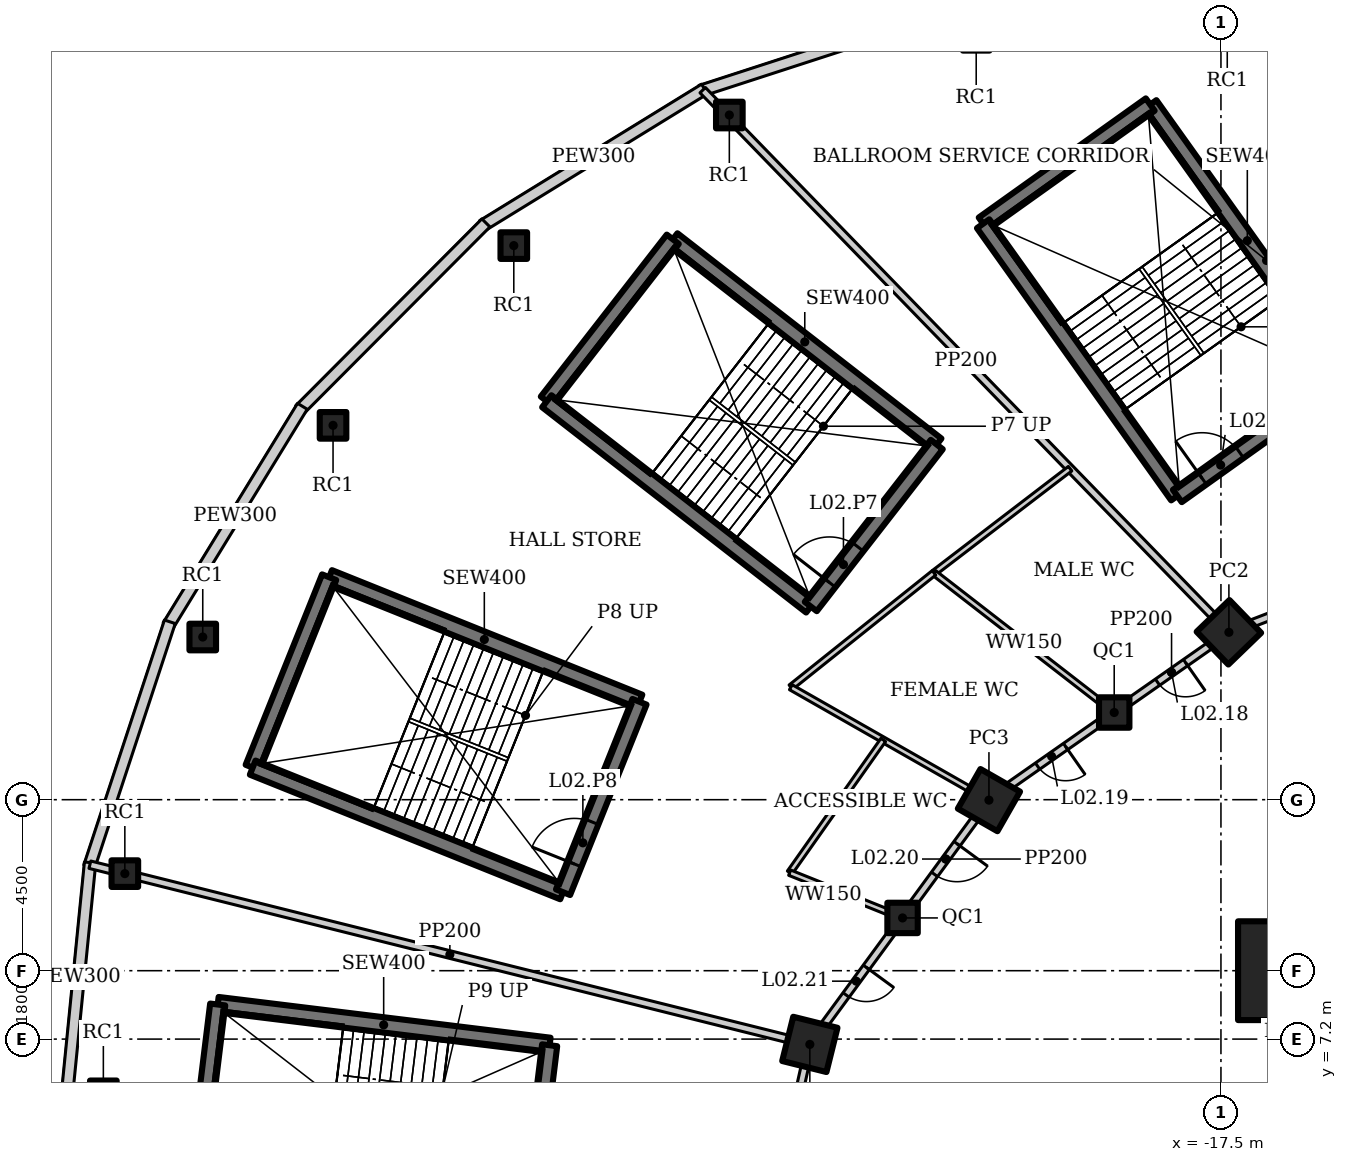
"""IFC4 building model, lengths in metres.
Left out: names, types, materials, properties, quantities, classifications, styles, units other than length and angle.
Written with IfcOpenShell. Run it as: python <this file> out.ifc"""

import sys

from ifc_helpers import new_model, si_unit, direction, frame, frame_2d, origin, origin_2d, place, context, subcontext, project, spatial, rectangle, hollow_rectangle, extrude, element, fill, save


model = new_model("IFC4")
c1 = context("Model", 3, precision=1e-05, world=origin(), true_north=direction((0.0, 1.0)))
c2 = subcontext(c1, "Body", "Model", "MODEL_VIEW")
j1 = project(units=[si_unit("LENGTHUNIT", "METRE"), si_unit("PLANEANGLEUNIT", "RADIAN")], contexts=[c1])
p1 = place(None, origin())
s1 = spatial("IfcSite", under=j1, at=p1, CompositionType="ELEMENT")
p2 = place(p1, origin())
s2 = spatial("IfcBuilding", under=s1, at=p2, CompositionType="ELEMENT")
p3 = place(p2, frame((0.0, 0.0, 14.5)))
s3 = spatial("IfcBuildingStorey", under=s2, at=p3, CompositionType="ELEMENT", Elevation=14.5)
p4 = place(p3, frame((-15.75, 9.0, 0.0), z_axis=(0.0, 0.0, 1.0), x_axis=(1.0, 0.0, 0.0)))
e1 = element("IfcColumn", 1, at=p4, inside=s3, PredefinedType="COLUMN", context=c2, shape_type="SweptSolid", body=[
    extrude(hollow_rectangle(XDim=2.6, YDim=2.6, WallThickness=0.13, at=origin_2d()), origin(), (0.0, 0.0, 1.0), 7.5),
])
p5 = place(p3, frame((-17.291, 17.905, 0.0), z_axis=(0.0, 0.0, 1.0), x_axis=(0.719339800339, 0.694658370459, 0.0)))
e2 = element("IfcColumn", 2, at=p5, inside=s3, PredefinedType="COLUMN", context=c2, shape_type="SweptSolid", body=[
    extrude(hollow_rectangle(XDim=1.2, YDim=1.2, WallThickness=0.1, at=origin_2d()), origin(), (0.0, 0.0, 1.0), 7.5),
])
p6 = place(p3, frame((-23.605, 13.489, 0.0), z_axis=(0.0, 0.0, 1.0), x_axis=(0.496139221777, 0.86824298017, 0.0)))
e3 = element("IfcColumn", 3, at=p6, inside=s3, PredefinedType="COLUMN", context=c2, shape_type="SweptSolid", body=[
    extrude(hollow_rectangle(XDim=1.2, YDim=1.2, WallThickness=0.12, at=origin_2d()), origin(), (0.0, 0.0, 1.0), 7.5),
])
p7 = place(p3, frame((-28.318, 7.06, 0.0), z_axis=(0.0, 0.0, 1.0), x_axis=(0.2419218956, 0.970295726276, 0.0)))
e4 = element("IfcColumn", 4, at=p7, inside=s3, PredefinedType="COLUMN", context=c2, shape_type="SweptSolid", body=[
    extrude(hollow_rectangle(XDim=1.2, YDim=1.2, WallThickness=0.1, at=origin_2d()), origin(), (0.0, 0.0, 1.0), 7.5),
])
for number, where, z_axis, x_axis in (
    (5, (-20.309, 15.794, 0.0), (0.0, 0.0, 1.0), (1.0, 0.0, 0.0)),
    (6, (-25.878, 10.388, 0.0), (0.0, 0.0, 1.0), (1.0, 0.0, 0.0)),
):
    element("IfcColumn", number, at=place(p3, frame(where, z_axis=z_axis, x_axis=x_axis)), inside=s3, PredefinedType="COLUMN", context=c2, shape_type="SweptSolid", body=[
        extrude(hollow_rectangle(XDim=0.8, YDim=0.8, WallThickness=0.05, at=origin_2d()), origin(), (0.0, 0.0, 1.0), 7.5),
    ])
for number, where, z_axis, x_axis in (
    (7, (-36.108, 28.081, 0.0), (0.0, 0.0, 1.0), (1.0, 0.0, 0.0)),
    (8, (-44.292, 17.781, 0.0), (0.0, 0.0, 1.0), (1.0, 0.0, 0.0)),
    (9, (-46.908, 5.76, 0.0), (0.0, 0.0, 1.0), (1.0, 0.0, 0.0)),
    (10, (-30.436, 31.518, 0.0), (0.0, 0.0, 1.0), (1.0, 0.0, 0.0)),
    (11, (-40.864, 23.351, 0.0), (0.0, 0.0, 1.0), (1.0, 0.0, 0.0)),
    (12, (-46.343, 11.554, 0.0), (0.0, 0.0, 1.0), (1.0, 0.0, 0.0)),
):
    element("IfcColumn", number, at=place(p3, frame(where, z_axis=z_axis, x_axis=x_axis)), inside=s3, PredefinedType="COLUMN", context=c2, shape_type="SweptSolid", body=[
        extrude(hollow_rectangle(XDim=0.7, YDim=0.7, WallThickness=0.04, at=origin_2d()), origin(), (0.0, 0.0, 1.0), 7.5),
    ])
p8 = place(p3, frame((-24.495, 34.328, 0.0), z_axis=(0.0, 0.0, 1.0), x_axis=(-0.951140010357, -0.308759907853, 0.0)))
e13 = element("IfcWall", 13, at=p8, inside=s3, PredefinedType="SOLIDWALL", context=c2, shape_type="SweptSolid", body=[
    extrude(rectangle(XDim=7.041, YDim=0.3, at=frame_2d((3.521, 0.0))), origin(), (0.0, 0.0, 1.0), 7.3),
])
p9 = place(p3, frame((-31.088, 32.202, 0.0), z_axis=(0.0, 0.0, 1.0), x_axis=(-0.851808565246, -0.52385319334, 0.0)))
e14 = element("IfcWall", 14, at=p9, inside=s3, PredefinedType="SOLIDWALL", context=c2, shape_type="SweptSolid", body=[
    extrude(rectangle(XDim=6.861, YDim=0.3, at=frame_2d((3.43, 0.0))), origin(), (0.0, 0.0, 1.0), 7.3),
])
p10 = place(p3, frame((-36.842, 28.679, 0.0), z_axis=(0.0, 0.0, 1.0), x_axis=(-0.705874614645, -0.708336804352, 0.0)))
e15 = element("IfcWall", 15, at=p10, inside=s3, PredefinedType="SOLIDWALL", context=c2, shape_type="SweptSolid", body=[
    extrude(rectangle(XDim=6.941, YDim=0.3, at=frame_2d((3.47, 0.0))), origin(), (0.0, 0.0, 1.0), 7.3),
])
p11 = place(p3, frame((-41.67, 23.852, 0.0), z_axis=(0.0, 0.0, 1.0), x_axis=(-0.52225340952, -0.852790347181, 0.0)))
e16 = element("IfcWall", 16, at=p11, inside=s3, PredefinedType="SOLIDWALL", context=c2, shape_type="SweptSolid", body=[
    extrude(rectangle(XDim=6.771, YDim=0.3, at=frame_2d((3.385, 0.0))), origin(), (0.0, 0.0, 1.0), 7.3),
])
p12 = place(p3, frame((-45.158, 18.182, 0.0), z_axis=(0.0, 0.0, 1.0), x_axis=(-0.31263149373, -0.94987449125, 0.0)))
e17 = element("IfcWall", 17, at=p12, inside=s3, PredefinedType="SOLIDWALL", context=c2, shape_type="SweptSolid", body=[
    extrude(rectangle(XDim=6.786, YDim=0.3, at=frame_2d((3.393, 0.0))), origin(), (0.0, 0.0, 1.0), 7.3),
])
p13 = place(p3, frame((-47.257, 11.845, 0.0), z_axis=(0.0, 0.0, 1.0), x_axis=(-0.099051198898, -0.9950823383, 0.0)))
e18 = element("IfcWall", 18, at=p13, inside=s3, PredefinedType="SOLIDWALL", context=c2, shape_type="SweptSolid", body=[
    extrude(rectangle(XDim=6.036, YDim=0.3, at=frame_2d((3.018, 0.0))), origin(), (0.0, 0.0, 1.0), 7.3),
])
p14 = place(p3, frame((-13.745, 19.27, 0.0), z_axis=(0.0, 0.0, 1.0), x_axis=(-0.933224646415, -0.359293416754, 0.0)))
e19 = element("IfcWall", 19, at=p14, inside=s3, PredefinedType="SOLIDWALL", context=c2, shape_type="SweptSolid", body=[
    extrude(rectangle(XDim=3.799, YDim=0.2, at=frame_2d((1.899, 0.0))), origin(), (0.0, 0.0, 1.0), 6.764),
])
p15 = place(p3, frame((-17.291, 17.905, 0.0), z_axis=(0.0, 0.0, 1.0), x_axis=(-0.819409395821, -0.573208724672, 0.0)))
e20 = element("IfcWall", 20, at=p15, inside=s3, PredefinedType="SOLIDWALL", context=c2, shape_type="SweptSolid", body=[
    extrude(rectangle(XDim=3.683, YDim=0.2, at=frame_2d((1.841, 0.0))), origin(), (0.0, 0.0, 1.0), 6.896),
])
p16 = place(p15, frame((1.391, 0.0, 0.0)))
e21 = element("IfcOpeningElement", 21, at=p16, cuts=e20, PredefinedType="OPENING", context=c2, shape_type="SweptSolid", body=[
    extrude(rectangle(XDim=0.9, YDim=2.1, at=frame_2d((0.45, 1.05))), frame((0.0, 0.11, 0.0), z_axis=(0.0, -1.0, 0.0), x_axis=(1.0, 0.0, 0.0)), (0.0, 0.0, 1.0), 0.22),
])
p17 = place(p3, frame((-20.309, 15.794, 0.0), z_axis=(0.0, 0.0, 1.0), x_axis=(-0.819442856133, -0.573160889744, 0.0)))
e22 = element("IfcWall", 22, at=p17, inside=s3, PredefinedType="SOLIDWALL", context=c2, shape_type="SweptSolid", body=[
    extrude(rectangle(XDim=4.023, YDim=0.2, at=frame_2d((2.011, 0.0))), origin(), (0.0, 0.0, 1.0), 6.896),
])
p18 = place(p17, frame((1.561, 0.0, 0.0)))
e23 = element("IfcOpeningElement", 23, at=p18, cuts=e22, PredefinedType="OPENING", context=c2, shape_type="SweptSolid", body=[
    extrude(rectangle(XDim=0.9, YDim=2.1, at=frame_2d((0.45, 1.05))), frame((0.0, 0.11, 0.0), z_axis=(0.0, -1.0, 0.0), x_axis=(1.0, 0.0, 0.0)), (0.0, 0.0, 1.0), 0.22),
])
p19 = place(p3, frame((-23.605, 13.489, 0.0), z_axis=(0.0, 0.0, 1.0), x_axis=(-0.591286566758, -0.806461527893, 0.0)))
e24 = element("IfcWall", 24, at=p19, inside=s3, PredefinedType="SOLIDWALL", context=c2, shape_type="SweptSolid", body=[
    extrude(rectangle(XDim=3.844, YDim=0.2, at=frame_2d((1.922, 0.0))), origin(), (0.0, 0.0, 1.0), 6.896),
])
p20 = place(p19, frame((1.422, 0.0, 0.0)))
e25 = element("IfcOpeningElement", 25, at=p20, cuts=e24, PredefinedType="OPENING", context=c2, shape_type="SweptSolid", body=[
    extrude(rectangle(XDim=1.0, YDim=2.1, at=frame_2d((0.5, 1.05))), frame((0.0, 0.11, 0.0), z_axis=(0.0, -1.0, 0.0), x_axis=(1.0, 0.0, 0.0)), (0.0, 0.0, 1.0), 0.22),
])
p21 = place(p3, frame((-25.878, 10.388, 0.0), z_axis=(0.0, 0.0, 1.0), x_axis=(-0.591255937291, -0.806483984105, 0.0)))
e26 = element("IfcWall", 26, at=p21, inside=s3, PredefinedType="SOLIDWALL", context=c2, shape_type="SweptSolid", body=[
    extrude(rectangle(XDim=4.127, YDim=0.2, at=frame_2d((2.063, 0.0))), origin(), (0.0, 0.0, 1.0), 6.896),
])
p22 = place(p21, frame((1.613, 0.0, 0.0)))
e27 = element("IfcOpeningElement", 27, at=p22, cuts=e26, PredefinedType="OPENING", context=c2, shape_type="SweptSolid", body=[
    extrude(rectangle(XDim=0.9, YDim=2.1, at=frame_2d((0.45, 1.05))), frame((0.0, 0.11, 0.0), z_axis=(0.0, -1.0, 0.0), x_axis=(1.0, 0.0, 0.0)), (0.0, 0.0, 1.0), 0.22),
])
p23 = place(p3, frame((-28.318, 7.06, 0.0), z_axis=(0.0, 0.0, 1.0), x_axis=(-0.218673326171, -0.97579812278, 0.0)))
e28 = element("IfcWall", 28, at=p23, inside=s3, PredefinedType="SOLIDWALL", context=c2, shape_type="SweptSolid", body=[
    extrude(rectangle(XDim=3.574, YDim=0.2, at=frame_2d((1.787, 0.0))), origin(), (0.0, 0.0, 1.0), 6.85),
])
p24 = place(p3, frame((-17.291, 17.905, 0.0), z_axis=(0.0, 0.0, 1.0), x_axis=(-0.696460684513, 0.717594951855, 0.0)))
e29 = element("IfcWall", 29, at=p24, inside=s3, PredefinedType="SOLIDWALL", context=c2, shape_type="SweptSolid", body=[
    extrude(rectangle(XDim=19.881, YDim=0.2, at=frame_2d((9.94, 0.0))), origin(), (0.0, 0.0, 1.0), 5.8),
])
p25 = place(p3, frame((-28.318, 7.06, 0.0), z_axis=(0.0, 0.0, 1.0), x_axis=(-0.970227758662, 0.242194335859, 0.0)))
e30 = element("IfcWall", 30, at=p25, inside=s3, PredefinedType="SOLIDWALL", context=c2, shape_type="SweptSolid", body=[
    extrude(rectangle(XDim=19.526, YDim=0.2, at=frame_2d((9.763, 0.0))), origin(), (0.0, 0.0, 1.0), 5.8),
])
p26 = place(p3, frame((-21.469, 22.211, 0.0), z_axis=(0.0, 0.0, 1.0), x_axis=(-0.794122703503, -0.607757461313, 0.0)))
e31 = element("IfcWall", 31, at=p26, inside=s3, PredefinedType="SOLIDWALL", context=c2, shape_type="SweptSolid", body=[
    extrude(rectangle(XDim=4.51, YDim=0.15, at=frame_2d((2.255, 0.0))), origin(), (0.0, 0.0, 1.0), 7.3),
])
p27 = place(p3, frame((-20.309, 15.794, 0.0), z_axis=(0.0, 0.0, 1.0), x_axis=(-0.790437708207, 0.61254243073, 0.0)))
e32 = element("IfcWall", 32, at=p27, inside=s3, PredefinedType="SOLIDWALL", context=c2, shape_type="SweptSolid", body=[
    extrude(rectangle(XDim=6.0, YDim=0.15, at=frame_2d((3.0, 0.0))), origin(), (0.0, 0.0, 1.0), 7.3),
])
p28 = place(p3, frame((-25.051, 19.469, 0.0), z_axis=(0.0, 0.0, 1.0), x_axis=(-0.781204641684, -0.624275025779, 0.0)))
e33 = element("IfcWall", 33, at=p28, inside=s3, PredefinedType="SOLIDWALL", context=c2, shape_type="SweptSolid", body=[
    extrude(rectangle(XDim=4.821, YDim=0.15, at=frame_2d((2.411, 0.0))), origin(), (0.0, 0.0, 1.0), 7.3),
])
p29 = place(p3, frame((-23.605, 13.489, 0.0), z_axis=(0.0, 0.0, 1.0), x_axis=(-0.868778495598, 0.49520089417, 0.0)))
e34 = element("IfcWall", 34, at=p29, inside=s3, PredefinedType="SOLIDWALL", context=c2, shape_type="SweptSolid", body=[
    extrude(rectangle(XDim=6.0, YDim=0.15, at=frame_2d((3.0, 0.0))), origin(), (0.0, 0.0, 1.0), 5.8),
])
p30 = place(p3, frame((-26.385, 15.073, 0.0), z_axis=(0.0, 0.0, 1.0), x_axis=(-0.576153892924, -0.81734123331, 0.0)))
e35 = element("IfcWall", 35, at=p30, inside=s3, PredefinedType="SOLIDWALL", context=c2, shape_type="SweptSolid", body=[
    extrude(rectangle(XDim=4.275, YDim=0.15, at=frame_2d((2.137, 0.0))), origin(), (0.0, 0.0, 1.0), 7.3),
])
p31 = place(p3, frame((-25.878, 10.388, 0.0), z_axis=(0.0, 0.0, 1.0), x_axis=(-0.928160641083, 0.372179827966, 0.0)))
e36 = element("IfcWall", 36, at=p31, inside=s3, PredefinedType="SOLIDWALL", context=c2, shape_type="SweptSolid", body=[
    extrude(rectangle(XDim=3.2, YDim=0.15, at=frame_2d((1.6, 0.0))), origin(), (0.0, 0.0, 1.0), 7.3),
])
p32 = place(p3, frame((-14.251, 24.629, 0.0), z_axis=(0.0, 0.0, 1.0), x_axis=(-0.580705313356, 0.814113836659, 0.0)))
e37 = element("IfcWall", 37, at=p32, inside=s3, PredefinedType="SHEAR", context=c2, shape_type="SweptSolid", body=[
    extrude(rectangle(XDim=8.8, YDim=0.4, at=frame_2d((4.4, 0.0))), origin(), (0.0, 0.0, 1.0), 7.5),
])
p33 = place(p3, frame((-19.361, 31.793, 0.0), z_axis=(0.0, 0.0, 1.0), x_axis=(-0.814121252423, -0.580694916762, 0.0)))
e38 = element("IfcWall", 38, at=p33, inside=s3, PredefinedType="SHEAR", context=c2, shape_type="SweptSolid", body=[
    extrude(rectangle(XDim=5.4, YDim=0.4, at=frame_2d((2.7, 0.0))), origin(), (0.0, 0.0, 1.0), 7.5),
])
p34 = place(p3, frame((-23.757, 28.657, 0.0), z_axis=(0.0, 0.0, 1.0), x_axis=(0.580705313356, -0.814113836659, 0.0)))
e39 = element("IfcWall", 39, at=p34, inside=s3, PredefinedType="SHEAR", context=c2, shape_type="SweptSolid", body=[
    extrude(rectangle(XDim=8.8, YDim=0.4, at=frame_2d((4.4, 0.0))), origin(), (0.0, 0.0, 1.0), 7.5),
])
p35 = place(p3, frame((-18.647, 21.493, 0.0), z_axis=(0.0, 0.0, 1.0), x_axis=(0.814121252423, 0.580694916762, 0.0)))
e40 = element("IfcWall", 40, at=p35, inside=s3, PredefinedType="SHEAR", context=c2, shape_type="SweptSolid", body=[
    extrude(rectangle(XDim=5.4, YDim=0.4, at=frame_2d((2.7, 0.0))), origin(), (0.0, 0.0, 1.0), 7.5),
])
p36 = place(p35, frame((0.8, 0.0, 0.0)))
e41 = element("IfcOpeningElement", 41, at=p36, cuts=e40, PredefinedType="OPENING", context=c2, shape_type="SweptSolid", body=[
    extrude(rectangle(XDim=1.2, YDim=2.1, at=frame_2d((0.6, 1.05))), frame((0.0, 0.21, 0.0), z_axis=(0.0, -1.0, 0.0), x_axis=(1.0, 0.0, 0.0)), (0.0, 0.0, 1.0), 0.42),
])
p37 = place(p3, frame((-24.978, 22.846, 0.0), z_axis=(0.0, 0.0, 1.0), x_axis=(-0.78938060008, 0.613904119726, 0.0)))
e42 = element("IfcWall", 42, at=p37, inside=s3, PredefinedType="SHEAR", context=c2, shape_type="SweptSolid", body=[
    extrude(rectangle(XDim=8.8, YDim=0.4, at=frame_2d((4.4, 0.0))), origin(), (0.0, 0.0, 1.0), 7.5),
])
p38 = place(p3, frame((-31.924, 28.248, 0.0), z_axis=(0.0, 0.0, 1.0), x_axis=(-0.613912443548, -0.789374126544, 0.0)))
e43 = element("IfcWall", 43, at=p38, inside=s3, PredefinedType="SHEAR", context=c2, shape_type="SweptSolid", body=[
    extrude(rectangle(XDim=5.4, YDim=0.4, at=frame_2d((2.7, 0.0))), origin(), (0.0, 0.0, 1.0), 7.5),
])
p39 = place(p3, frame((-35.239, 23.985, 0.0), z_axis=(0.0, 0.0, 1.0), x_axis=(0.78938060008, -0.613904119726, 0.0)))
e44 = element("IfcWall", 44, at=p39, inside=s3, PredefinedType="SHEAR", context=c2, shape_type="SweptSolid", body=[
    extrude(rectangle(XDim=8.8, YDim=0.4, at=frame_2d((4.4, 0.0))), origin(), (0.0, 0.0, 1.0), 7.5),
])
p40 = place(p3, frame((-28.293, 18.583, 0.0), z_axis=(0.0, 0.0, 1.0), x_axis=(0.613912443548, 0.789374126544, 0.0)))
e45 = element("IfcWall", 45, at=p40, inside=s3, PredefinedType="SHEAR", context=c2, shape_type="SweptSolid", body=[
    extrude(rectangle(XDim=5.4, YDim=0.4, at=frame_2d((2.7, 0.0))), origin(), (0.0, 0.0, 1.0), 7.5),
])
p41 = place(p40, frame((0.8, 0.0, 0.0)))
e46 = element("IfcOpeningElement", 46, at=p41, cuts=e45, PredefinedType="OPENING", context=c2, shape_type="SweptSolid", body=[
    extrude(rectangle(XDim=1.2, YDim=2.1, at=frame_2d((0.6, 1.05))), frame((0.0, 0.21, 0.0), z_axis=(0.0, -1.0, 0.0), x_axis=(1.0, 0.0, 0.0)), (0.0, 0.0, 1.0), 0.42),
])
p42 = place(p3, frame((-32.8, 16.077, 0.0), z_axis=(0.0, 0.0, 1.0), x_axis=(-0.92801678004, 0.372538395288, 0.0)))
e47 = element("IfcWall", 47, at=p42, inside=s3, PredefinedType="SHEAR", context=c2, shape_type="SweptSolid", body=[
    extrude(rectangle(XDim=8.8, YDim=0.4, at=frame_2d((4.4, 0.0))), origin(), (0.0, 0.0, 1.0), 7.5),
])
p43 = place(p3, frame((-40.967, 19.355, 0.0), z_axis=(0.0, 0.0, 1.0), x_axis=(-0.372544066459, -0.928014503414, 0.0)))
e48 = element("IfcWall", 48, at=p43, inside=s3, PredefinedType="SHEAR", context=c2, shape_type="SweptSolid", body=[
    extrude(rectangle(XDim=5.4, YDim=0.4, at=frame_2d((2.7, 0.0))), origin(), (0.0, 0.0, 1.0), 7.5),
])
p44 = place(p3, frame((-42.978, 14.344, 0.0), z_axis=(0.0, 0.0, 1.0), x_axis=(0.92801678004, -0.372538395288, 0.0)))
e49 = element("IfcWall", 49, at=p44, inside=s3, PredefinedType="SHEAR", context=c2, shape_type="SweptSolid", body=[
    extrude(rectangle(XDim=8.8, YDim=0.4, at=frame_2d((4.4, 0.0))), origin(), (0.0, 0.0, 1.0), 7.5),
])
p45 = place(p3, frame((-34.812, 11.065, 0.0), z_axis=(0.0, 0.0, 1.0), x_axis=(0.372544066459, 0.928014503414, 0.0)))
e50 = element("IfcWall", 50, at=p45, inside=s3, PredefinedType="SHEAR", context=c2, shape_type="SweptSolid", body=[
    extrude(rectangle(XDim=5.4, YDim=0.4, at=frame_2d((2.7, 0.0))), origin(), (0.0, 0.0, 1.0), 7.5),
])
p46 = place(p45, frame((0.8, 0.0, 0.0)))
e51 = element("IfcOpeningElement", 51, at=p46, cuts=e50, PredefinedType="OPENING", context=c2, shape_type="SweptSolid", body=[
    extrude(rectangle(XDim=1.2, YDim=2.1, at=frame_2d((0.6, 1.05))), frame((0.0, 0.21, 0.0), z_axis=(0.0, -1.0, 0.0), x_axis=(1.0, 0.0, 0.0)), (0.0, 0.0, 1.0), 0.42),
])
p47 = place(p3, frame((-35.165, 7.038, 0.0), z_axis=(0.0, 0.0, 1.0), x_axis=(-0.992545280606, 0.121876437212, 0.0)))
e52 = element("IfcWall", 52, at=p47, inside=s3, PredefinedType="SHEAR", context=c2, shape_type="SweptSolid", body=[
    extrude(rectangle(XDim=8.8, YDim=0.4, at=frame_2d((4.4, 0.0))), origin(), (0.0, 0.0, 1.0), 7.5),
])
p48 = place(p3, frame((-43.899, 8.11, 0.0), z_axis=(0.0, 0.0, 1.0), x_axis=(-0.12184754212, -0.99254882826, 0.0)))
e53 = element("IfcWall", 53, at=p48, inside=s3, PredefinedType="SHEAR", context=c2, shape_type="SweptSolid", body=[
    extrude(rectangle(XDim=5.4, YDim=0.4, at=frame_2d((2.7, 0.0))), origin(), (0.0, 0.0, 1.0), 7.5),
])
p49 = place(p3, frame((-35.823, 1.678, 0.0), z_axis=(0.0, 0.0, 1.0), x_axis=(0.12184754212, 0.99254882826, 0.0)))
e54 = element("IfcWall", 54, at=p49, inside=s3, PredefinedType="SHEAR", context=c2, shape_type="SweptSolid", body=[
    extrude(rectangle(XDim=5.4, YDim=0.4, at=frame_2d((2.7, 0.0))), origin(), (0.0, 0.0, 1.0), 7.5),
])
p50 = place(p49, frame((0.8, 0.0, 0.0)))
e55 = element("IfcOpeningElement", 55, at=p50, cuts=e54, PredefinedType="OPENING", context=c2, shape_type="SweptSolid", body=[
    extrude(rectangle(XDim=1.2, YDim=2.1, at=frame_2d((0.6, 1.05))), frame((0.0, 0.21, 0.0), z_axis=(0.0, -1.0, 0.0), x_axis=(1.0, 0.0, 0.0)), (0.0, 0.0, 1.0), 0.42),
])
p51 = place(p16, origin())
e56 = element("IfcDoor", 56, at=p51, inside=s3, OperationType="SINGLE_SWING_LEFT", PredefinedType="DOOR", context=c2, shape_type="SweptSolid", body=[
    extrude(rectangle(XDim=0.9, YDim=2.1, at=frame_2d((0.45, 1.05))), frame((0.0, 0.025, 0.0), z_axis=(0.0, -1.0, 0.0), x_axis=(1.0, 0.0, 0.0)), (0.0, 0.0, 1.0), 0.05),
])
fill(e21, e56)
p52 = place(p18, origin())
e57 = element("IfcDoor", 57, at=p52, inside=s3, OperationType="SINGLE_SWING_LEFT", PredefinedType="DOOR", context=c2, shape_type="SweptSolid", body=[
    extrude(rectangle(XDim=0.9, YDim=2.1, at=frame_2d((0.45, 1.05))), frame((0.0, 0.025, 0.0), z_axis=(0.0, -1.0, 0.0), x_axis=(1.0, 0.0, 0.0)), (0.0, 0.0, 1.0), 0.05),
])
fill(e23, e57)
p53 = place(p20, origin())
e58 = element("IfcDoor", 58, at=p53, inside=s3, OperationType="SINGLE_SWING_LEFT", PredefinedType="DOOR", context=c2, shape_type="SweptSolid", body=[
    extrude(rectangle(XDim=1.0, YDim=2.1, at=frame_2d((0.5, 1.05))), frame((0.0, 0.025, 0.0), z_axis=(0.0, -1.0, 0.0), x_axis=(1.0, 0.0, 0.0)), (0.0, 0.0, 1.0), 0.05),
])
fill(e25, e58)
p54 = place(p22, origin())
e59 = element("IfcDoor", 59, at=p54, inside=s3, OperationType="SINGLE_SWING_LEFT", PredefinedType="DOOR", context=c2, shape_type="SweptSolid", body=[
    extrude(rectangle(XDim=0.9, YDim=2.1, at=frame_2d((0.45, 1.05))), frame((0.0, 0.025, 0.0), z_axis=(0.0, -1.0, 0.0), x_axis=(1.0, 0.0, 0.0)), (0.0, 0.0, 1.0), 0.05),
])
fill(e27, e59)
p55 = place(p36, origin())
e60 = element("IfcDoor", 60, at=p55, inside=s3, OperationType="SINGLE_SWING_RIGHT", PredefinedType="DOOR", context=c2, shape_type="SweptSolid", body=[
    extrude(rectangle(XDim=1.2, YDim=2.1, at=frame_2d((0.6, 1.05))), frame((0.0, 0.025, 0.0), z_axis=(0.0, -1.0, 0.0), x_axis=(1.0, 0.0, 0.0)), (0.0, 0.0, 1.0), 0.05),
])
fill(e41, e60)
p56 = place(p41, origin())
e61 = element("IfcDoor", 61, at=p56, inside=s3, OperationType="SINGLE_SWING_RIGHT", PredefinedType="DOOR", context=c2, shape_type="SweptSolid", body=[
    extrude(rectangle(XDim=1.2, YDim=2.1, at=frame_2d((0.6, 1.05))), frame((0.0, 0.025, 0.0), z_axis=(0.0, -1.0, 0.0), x_axis=(1.0, 0.0, 0.0)), (0.0, 0.0, 1.0), 0.05),
])
fill(e46, e61)
p57 = place(p46, origin())
e62 = element("IfcDoor", 62, at=p57, inside=s3, OperationType="SINGLE_SWING_RIGHT", PredefinedType="DOOR", context=c2, shape_type="SweptSolid", body=[
    extrude(rectangle(XDim=1.2, YDim=2.1, at=frame_2d((0.6, 1.05))), frame((0.0, 0.025, 0.0), z_axis=(0.0, -1.0, 0.0), x_axis=(1.0, 0.0, 0.0)), (0.0, 0.0, 1.0), 0.05),
])
fill(e51, e62)
save(model, sys.argv[1])
